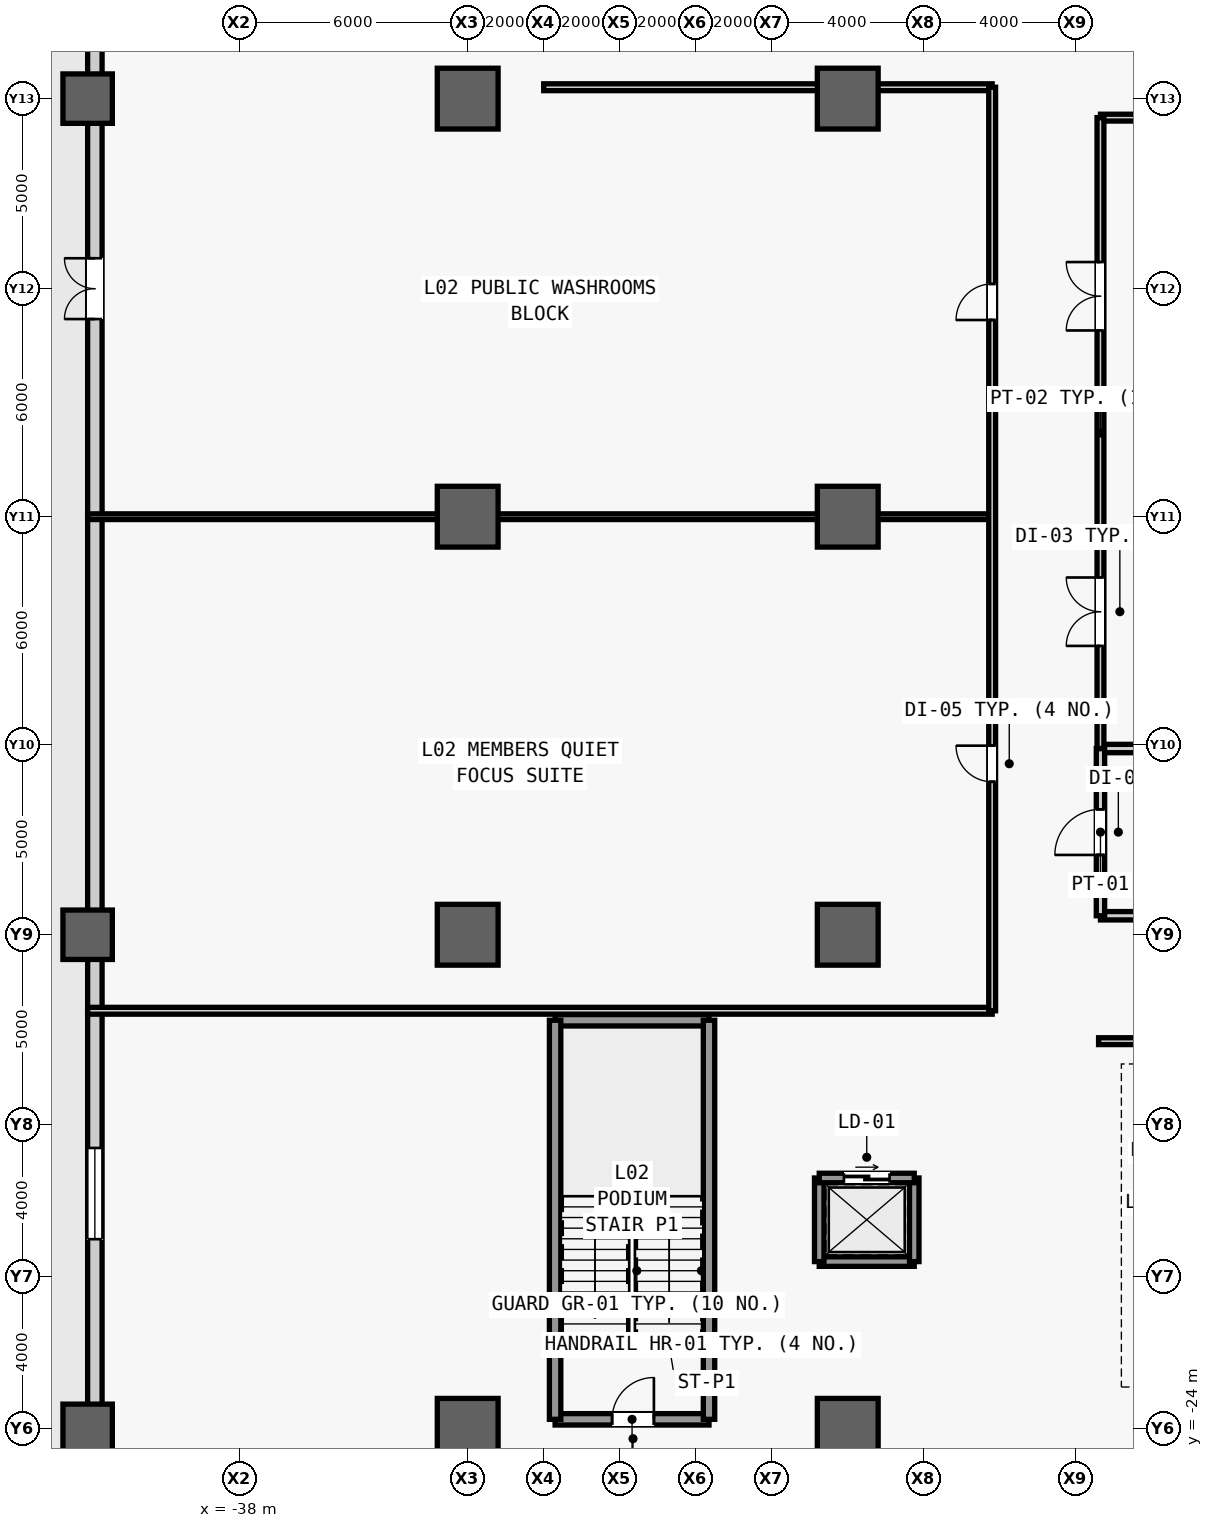
"""IFC4 building model, lengths in metres.
Left out: names, types, materials, properties, quantities, classifications, styles, units other than length and angle.
Written with IfcOpenShell. Run it as: python <this file> out.ifc"""

import sys

from ifc_helpers import new_model, si_unit, direction, frame, frame_2d, origin, origin_2d, place, context, subcontext, project, spatial, rectangle, extrude, source, transform, mapped, element, fill, save


model = new_model("IFC4")
c1 = context("Model", 3, precision=1e-05, world=origin(), true_north=direction((0.0, 1.0)))
c2 = subcontext(c1, "Body", "Model", "MODEL_VIEW")
j1 = project(units=[si_unit("LENGTHUNIT", "METRE"), si_unit("PLANEANGLEUNIT", "RADIAN")], contexts=[c1])
p1 = place(None, origin())
s1 = spatial("IfcSite", under=j1, at=p1, CompositionType="ELEMENT")
p2 = place(p1, origin())
s2 = spatial("IfcBuilding", under=s1, at=p2, CompositionType="ELEMENT")
p3 = place(p2, frame((0.0, 0.0, 12.0)))
s3 = spatial("IfcBuildingStorey", under=s2, at=p3, CompositionType="ELEMENT", Elevation=12.0)
m1 = source(origin(), c2, "Body", "SweptSolid", [
    extrude(rectangle(XDim=1.3, YDim=1.3, at=origin_2d()), origin(), (0.0, 0.0, 1.0), 5.4),
])
for number, where, z_axis, x_axis in (
    (1, (-42.0, -24.0, 0.0), (0.0, 0.0, 1.0), (1.0, 0.0, 0.0)),
    (2, (-42.0, -11.0, 0.0), (0.0, 0.0, 1.0), (1.0, 0.0, 0.0)),
    (3, (-42.0, 11.0, 0.0), (0.0, 0.0, 1.0), (1.0, 0.0, 0.0)),
):
    element("IfcColumn", number, at=place(p3, frame(where, z_axis=z_axis, x_axis=x_axis)), inside=s3, PredefinedType="COLUMN", context=c2, shape_type="MappedRepresentation", body=[
        mapped(m1, transform((0.0, 0.0, 0.0), scale=1.0)),
    ])
m2 = source(origin(), c2, "Body", "SweptSolid", [
    extrude(rectangle(XDim=1.6, YDim=1.6, at=origin_2d()), origin(), (0.0, 0.0, 1.0), 5.4),
])
for number, where, z_axis, x_axis in (
    (4, (-32.0, -24.0, 0.0), (0.0, 0.0, 1.0), (1.0, 0.0, 0.0)),
    (5, (-32.0, -11.0, 0.0), (0.0, 0.0, 1.0), (1.0, 0.0, 0.0)),
    (6, (-32.0, 0.0, 0.0), (0.0, 0.0, 1.0), (1.0, 0.0, 0.0)),
    (7, (-32.0, 11.0, 0.0), (0.0, 0.0, 1.0), (1.0, 0.0, 0.0)),
    (8, (-22.0, -24.0, 0.0), (0.0, 0.0, 1.0), (1.0, 0.0, 0.0)),
    (9, (-22.0, -11.0, 0.0), (0.0, 0.0, 1.0), (1.0, 0.0, 0.0)),
    (10, (-22.0, 0.0, 0.0), (0.0, 0.0, 1.0), (1.0, 0.0, 0.0)),
    (11, (-22.0, 11.0, 0.0), (0.0, 0.0, 1.0), (1.0, 0.0, 0.0)),
):
    element("IfcColumn", number, at=place(p3, frame(where, z_axis=z_axis, x_axis=x_axis)), inside=s3, PredefinedType="COLUMN", context=c2, shape_type="MappedRepresentation", body=[
        mapped(m2, transform((0.0, 0.0, 0.0), scale=1.0)),
    ])
m3 = source(origin(), c2, "Body", "SweptSolid", [
    extrude(rectangle(XDim=71.24, YDim=0.38, at=frame_2d((35.62, 0.0))), origin(), (0.0, 0.0, 1.0), 3.28),
])
p4 = place(p3, frame((-41.81, -35.62, 0.0), z_axis=(0.0, 0.0, 1.0), x_axis=(0.0, 1.0, 0.0)))
e12 = element("IfcWall", 12, at=p4, inside=s3, PredefinedType="STANDARD", context=c2, shape_type="MappedRepresentation", body=[
    mapped(m3, transform((0.0, 0.0, 0.0), scale=1.0)),
])
m4 = source(origin(), c2, "Body", "SweptSolid", [
    extrude(rectangle(XDim=1.6, YDim=2.25, at=frame_2d((0.8, 1.125))), frame((0.0, 0.2, 0.0), z_axis=(0.0, -1.0, 0.0), x_axis=(1.0, 0.0, 0.0)), (0.0, 0.0, 1.0), 0.4),
])
p5 = place(p4, frame((40.82, 0.0, 0.0)))
e13 = element("IfcOpeningElement", 13, at=p5, cuts=e12, PredefinedType="OPENING", context=c2, shape_type="MappedRepresentation", body=[
    mapped(m4, transform((0.0, 0.0, 0.0), scale=1.0)),
])
m5 = source(origin(), c2, "Body", "SweptSolid", [
    extrude(rectangle(XDim=2.4, YDim=2.56, at=frame_2d((1.2, 1.28))), frame((0.0, 0.2, 0.0), z_axis=(0.0, -1.0, 0.0), x_axis=(1.0, 0.0, 0.0)), (0.0, 0.0, 1.0), 0.4),
])
p6 = place(p4, frame((16.61, 0.0, 0.5)))
e14 = element("IfcOpeningElement", 14, at=p6, cuts=e12, PredefinedType="OPENING", context=c2, shape_type="MappedRepresentation", body=[
    mapped(m5, transform((0.0, 0.0, 0.0), scale=1.0)),
])
p7 = place(p4, frame((52.23, 0.0, 0.5)))
e15 = element("IfcOpeningElement", 15, at=p7, cuts=e12, PredefinedType="OPENING", context=c2, shape_type="MappedRepresentation", body=[
    mapped(m5, transform((0.0, 0.0, 0.0), scale=1.0)),
])
m6 = source(origin(), c2, "Body", "SweptSolid", [
    extrude(rectangle(XDim=4.05, YDim=0.22, at=frame_2d((2.025, 0.0))), origin(), (0.0, 0.0, 1.0), 5.08),
])
for number, where, z_axis, x_axis in (
    (16, (-15.35, -10.5, 0.0), (0.0, 0.0, 1.0), (1.0, 0.0, 0.0)),
    (17, (-15.35, -6.1, 0.0), (0.0, 0.0, 1.0), (1.0, 0.0, 0.0)),
):
    element("IfcWall", number, at=place(p3, frame(where, z_axis=z_axis, x_axis=x_axis)), inside=s3, PredefinedType="PARTITIONING", context=c2, shape_type="MappedRepresentation", body=[
        mapped(m6, transform((0.0, 0.0, 0.0), scale=1.0)),
    ])
m7 = source(origin(), c2, "Body", "SweptSolid", [
    extrude(rectangle(XDim=4.4, YDim=0.22, at=frame_2d((2.2, 0.0))), origin(), (0.0, 0.0, 1.0), 5.08),
])
p8 = place(p3, frame((-15.35, -10.5, 0.0), z_axis=(0.0, 0.0, 1.0), x_axis=(0.0, 1.0, 0.0)))
e18 = element("IfcWall", 18, at=p8, inside=s3, PredefinedType="PARTITIONING", context=c2, shape_type="MappedRepresentation", body=[
    mapped(m7, transform((0.0, 0.0, 0.0), scale=1.0)),
])
m8 = source(origin(), c2, "Body", "SweptSolid", [
    extrude(rectangle(XDim=1.2, YDim=2.2, at=frame_2d((0.6, 1.1))), frame((0.0, 0.12, 0.0), z_axis=(0.0, -1.0, 0.0), x_axis=(1.0, 0.0, 0.0)), (0.0, 0.0, 1.0), 0.24),
])
p9 = place(p8, frame((1.6, 0.0, 0.0)))
e19 = element("IfcOpeningElement", 19, at=p9, cuts=e18, PredefinedType="OPENING", context=c2, shape_type="MappedRepresentation", body=[
    mapped(m8, transform((0.0, 0.0, 0.0), scale=1.0)),
])
m9 = source(origin(), c2, "Body", "SweptSolid", [
    extrude(rectangle(XDim=4.05, YDim=0.18, at=frame_2d((2.025, 0.0))), origin(), (0.0, 0.0, 1.0), 5.08),
])
p10 = place(p3, frame((-15.35, 10.5, 0.0), z_axis=(0.0, 0.0, 1.0), x_axis=(1.0, 0.0, 0.0)))
e20 = element("IfcWall", 20, at=p10, inside=s3, PredefinedType="PARTITIONING", context=c2, shape_type="MappedRepresentation", body=[
    mapped(m9, transform((0.0, 0.0, 0.0), scale=1.0)),
])
m10 = source(origin(), c2, "Body", "SweptSolid", [
    extrude(rectangle(XDim=16.6, YDim=0.18, at=frame_2d((8.3, 0.0))), origin(), (0.0, 0.0, 1.0), 5.08),
])
p11 = place(p3, frame((-15.35, -6.1, 0.0), z_axis=(0.0, 0.0, 1.0), x_axis=(0.0, 1.0, 0.0)))
e21 = element("IfcWall", 21, at=p11, inside=s3, PredefinedType="PARTITIONING", context=c2, shape_type="MappedRepresentation", body=[
    mapped(m10, transform((0.0, 0.0, 0.0), scale=1.0)),
])
m11 = source(origin(), c2, "Body", "SweptSolid", [
    extrude(rectangle(XDim=1.8, YDim=2.25, at=frame_2d((0.9, 1.125))), frame((0.0, 0.1, 0.0), z_axis=(0.0, -1.0, 0.0), x_axis=(1.0, 0.0, 0.0)), (0.0, 0.0, 1.0), 0.2),
])
p12 = place(p11, frame((2.7, 0.0, 0.0)))
e22 = element("IfcOpeningElement", 22, at=p12, cuts=e21, PredefinedType="OPENING", context=c2, shape_type="MappedRepresentation", body=[
    mapped(m11, transform((0.0, 0.0, 0.0), scale=1.0)),
])
p13 = place(p11, frame((11.0, 0.0, 0.0)))
e23 = element("IfcOpeningElement", 23, at=p13, cuts=e21, PredefinedType="OPENING", context=c2, shape_type="MappedRepresentation", body=[
    mapped(m11, transform((0.0, 0.0, 0.0), scale=1.0)),
])
m12 = source(origin(), c2, "Body", "SweptSolid", [
    extrude(rectangle(XDim=4.05, YDim=0.3, at=frame_2d((2.025, 0.0))), origin(), (0.0, 0.0, 1.0), 5.08),
])
p14 = place(p3, frame((-29.7, -23.75, 0.0), z_axis=(0.0, 0.0, 1.0), x_axis=(1.0, 0.0, 0.0)))
e24 = element("IfcWall", 24, at=p14, inside=s3, PredefinedType="SHEAR", context=c2, shape_type="MappedRepresentation", body=[
    mapped(m12, transform((0.0, 0.0, 0.0), scale=1.0)),
])
m13 = source(origin(), c2, "Body", "SweptSolid", [
    extrude(rectangle(XDim=1.1, YDim=2.2, at=frame_2d((0.55, 1.1))), frame((0.0, 0.16, 0.0), z_axis=(0.0, -1.0, 0.0), x_axis=(1.0, 0.0, 0.0)), (0.0, 0.0, 1.0), 0.32),
])
p15 = place(p14, frame((1.5, 0.0, 0.0)))
e25 = element("IfcOpeningElement", 25, at=p15, cuts=e24, PredefinedType="OPENING", context=c2, shape_type="MappedRepresentation", body=[
    mapped(m13, transform((0.0, 0.0, 0.0), scale=1.0)),
])
p16 = place(p3, frame((-29.7, -13.25, 0.0), z_axis=(0.0, 0.0, 1.0), x_axis=(1.0, 0.0, 0.0)))
e26 = element("IfcWall", 26, at=p16, inside=s3, PredefinedType="SHEAR", context=c2, shape_type="MappedRepresentation", body=[
    mapped(m12, transform((0.0, 0.0, 0.0), scale=1.0)),
])
m14 = source(origin(), c2, "Body", "SweptSolid", [
    extrude(rectangle(XDim=10.5, YDim=0.3, at=frame_2d((5.25, 0.0))), origin(), (0.0, 0.0, 1.0), 5.08),
])
for number, where, z_axis, x_axis in (
    (27, (-29.7, -23.75, 0.0), (0.0, 0.0, 1.0), (0.0, 1.0, 0.0)),
    (28, (-25.65, -23.75, 0.0), (0.0, 0.0, 1.0), (0.0, 1.0, 0.0)),
):
    element("IfcWall", number, at=place(p3, frame(where, z_axis=z_axis, x_axis=x_axis)), inside=s3, PredefinedType="SHEAR", context=c2, shape_type="MappedRepresentation", body=[
        mapped(m14, transform((0.0, 0.0, 0.0), scale=1.0)),
    ])
m15 = source(origin(), c2, "Body", "SweptSolid", [
    extrude(rectangle(XDim=2.5, YDim=0.25, at=frame_2d((1.25, 0.0))), origin(), (0.0, 0.0, 1.0), 5.08),
])
p17 = place(p3, frame((-22.75, -19.6, 0.0), z_axis=(0.0, 0.0, 1.0), x_axis=(1.0, 0.0, 0.0)))
e29 = element("IfcWall", 29, at=p17, inside=s3, PredefinedType="SHEAR", context=c2, shape_type="MappedRepresentation", body=[
    mapped(m15, transform((0.0, 0.0, 0.0), scale=1.0)),
])
m16 = source(origin(), c2, "Body", "SweptSolid", [
    extrude(rectangle(XDim=2.2, YDim=0.25, at=frame_2d((1.1, 0.0))), origin(), (0.0, 0.0, 1.0), 5.08),
])
for number, where, z_axis, x_axis in (
    (30, (-22.75, -19.6, 0.0), (0.0, 0.0, 1.0), (0.0, 1.0, 0.0)),
    (31, (-20.25, -19.6, 0.0), (0.0, 0.0, 1.0), (0.0, 1.0, 0.0)),
):
    element("IfcWall", number, at=place(p3, frame(where, z_axis=z_axis, x_axis=x_axis)), inside=s3, PredefinedType="SHEAR", context=c2, shape_type="MappedRepresentation", body=[
        mapped(m16, transform((0.0, 0.0, 0.0), scale=1.0)),
    ])
p18 = place(p3, frame((-22.75, -17.4, 0.0), z_axis=(0.0, 0.0, 1.0), x_axis=(1.0, 0.0, 0.0)))
e32 = element("IfcWall", 32, at=p18, inside=s3, PredefinedType="SHEAR", context=c2, shape_type="MappedRepresentation", body=[
    mapped(m15, transform((0.0, 0.0, 0.0), scale=1.0)),
])
m17 = source(origin(), c2, "Body", "SweptSolid", [
    extrude(rectangle(XDim=1.2, YDim=2.3, at=frame_2d((0.6, 1.15))), frame((0.0, 0.135, 0.0), z_axis=(0.0, -1.0, 0.0), x_axis=(1.0, 0.0, 0.0)), (0.0, 0.0, 1.0), 0.27),
])
p19 = place(p18, frame((0.65, 0.0, 0.0)))
e33 = element("IfcOpeningElement", 33, at=p19, cuts=e32, PredefinedType="OPENING", context=c2, shape_type="MappedRepresentation", body=[
    mapped(m17, transform((0.0, 0.0, 0.0), scale=1.0)),
])
m18 = source(origin(), c2, "Body", "SweptSolid", [
    extrude(rectangle(XDim=30.8, YDim=0.18, at=frame_2d((15.4, 0.0))), origin(), (0.0, 0.0, 1.0), 5.08),
])
p20 = place(p3, frame((-15.4, -13.8, 0.0), z_axis=(0.0, 0.0, 1.0), x_axis=(1.0, 0.0, 0.0)))
e34 = element("IfcWall", 34, at=p20, inside=s3, PredefinedType="PARTITIONING", context=c2, shape_type="MappedRepresentation", body=[
    mapped(m18, transform((0.0, 0.0, 0.0), scale=1.0)),
])
p21 = place(p20, frame((2.7, 0.0, 0.0)))
e35 = element("IfcOpeningElement", 35, at=p21, cuts=e34, PredefinedType="OPENING", context=c2, shape_type="MappedRepresentation", body=[
    mapped(m11, transform((0.0, 0.0, 0.0), scale=1.0)),
])
p22 = place(p20, frame((26.3, 0.0, 0.0)))
e36 = element("IfcOpeningElement", 36, at=p22, cuts=e34, PredefinedType="OPENING", context=c2, shape_type="MappedRepresentation", body=[
    mapped(m11, transform((0.0, 0.0, 0.0), scale=1.0)),
])
m19 = source(origin(), c2, "Body", "SweptSolid", [
    extrude(rectangle(XDim=11.8, YDim=0.18, at=frame_2d((5.9, 0.0))), origin(), (0.0, 0.0, 1.0), 3.28),
])
p23 = place(p3, frame((-30.0, 11.3, 0.0), z_axis=(0.0, 0.0, 1.0), x_axis=(1.0, 0.0, 0.0)))
e37 = element("IfcWall", 37, at=p23, inside=s3, PredefinedType="PARTITIONING", context=c2, shape_type="MappedRepresentation", body=[
    mapped(m19, transform((0.0, 0.0, 0.0), scale=1.0)),
])
m20 = source(origin(), c2, "Body", "SweptSolid", [
    extrude(rectangle(XDim=23.8, YDim=0.18, at=frame_2d((11.9, 0.0))), origin(), (0.0, 0.0, 1.0), 5.08),
])
p24 = place(p3, frame((-42.0, -13.0, 0.0), z_axis=(0.0, 0.0, 1.0), x_axis=(1.0, 0.0, 0.0)))
e38 = element("IfcWall", 38, at=p24, inside=s3, PredefinedType="PARTITIONING", context=c2, shape_type="MappedRepresentation", body=[
    mapped(m20, transform((0.0, 0.0, 0.0), scale=1.0)),
])
m21 = source(origin(), c2, "Body", "SweptSolid", [
    extrude(rectangle(XDim=23.8, YDim=0.15, at=frame_2d((11.9, 0.0))), origin(), (0.0, 0.0, 1.0), 3.28),
])
p25 = place(p3, frame((-42.0, 0.0, 0.0), z_axis=(0.0, 0.0, 1.0), x_axis=(1.0, 0.0, 0.0)))
e39 = element("IfcWall", 39, at=p25, inside=s3, PredefinedType="PARTITIONING", context=c2, shape_type="MappedRepresentation", body=[
    mapped(m21, transform((0.0, 0.0, 0.0), scale=1.0)),
])
m22 = source(origin(), c2, "Body", "SweptSolid", [
    extrude(rectangle(XDim=24.3, YDim=0.18, at=frame_2d((12.15, 0.0))), origin(), (0.0, 0.0, 1.0), 5.08),
])
p26 = place(p3, frame((-18.2, -13.0, 0.0), z_axis=(0.0, 0.0, 1.0), x_axis=(0.0, 1.0, 0.0)))
e40 = element("IfcWall", 40, at=p26, inside=s3, PredefinedType="PARTITIONING", context=c2, shape_type="MappedRepresentation", body=[
    mapped(m22, transform((0.0, 0.0, 0.0), scale=1.0)),
])
m23 = source(origin(), c2, "Body", "SweptSolid", [
    extrude(rectangle(XDim=0.95, YDim=2.15, at=frame_2d((0.475, 1.075))), frame((0.0, 0.1, 0.0), z_axis=(0.0, -1.0, 0.0), x_axis=(1.0, 0.0, 0.0)), (0.0, 0.0, 1.0), 0.2),
])
p27 = place(p26, frame((6.025, 0.0, 0.0)))
e41 = element("IfcOpeningElement", 41, at=p27, cuts=e40, PredefinedType="OPENING", context=c2, shape_type="MappedRepresentation", body=[
    mapped(m23, transform((0.0, 0.0, 0.0), scale=1.0)),
])
p28 = place(p26, frame((18.175, 0.0, 0.0)))
e42 = element("IfcOpeningElement", 42, at=p28, cuts=e40, PredefinedType="OPENING", context=c2, shape_type="MappedRepresentation", body=[
    mapped(m23, transform((0.0, 0.0, 0.0), scale=1.0)),
])
m24 = source(origin(), c2, "Body", "SweptSolid", [
    extrude(rectangle(XDim=1.6, YDim=2.25, at=frame_2d((0.8, 1.125))), frame((0.0, 0.025, 0.0), z_axis=(0.0, -1.0, 0.0), x_axis=(1.0, 0.0, 0.0)), (0.0, 0.0, 1.0), 0.05),
])
p29 = place(p5, origin())
e43 = element("IfcDoor", 43, at=p29, inside=s3, OperationType="DOUBLE_DOOR_SINGLE_SWING", PredefinedType="DOOR", context=c2, shape_type="MappedRepresentation", body=[
    mapped(m24, transform((0.0, 0.0, 0.0), scale=1.0)),
])
fill(e13, e43)
m25 = source(origin(), c2, "Body", "SweptSolid", [
    extrude(rectangle(XDim=2.4, YDim=2.56, at=frame_2d((1.2, 1.28))), frame((0.0, 0.03, 0.0), z_axis=(0.0, -1.0, 0.0), x_axis=(1.0, 0.0, 0.0)), (0.0, 0.0, 1.0), 0.06),
])
p30 = place(p6, origin())
e44 = element("IfcWindow", 44, at=p30, inside=s3, PartitioningType="SINGLE_PANEL", PredefinedType="WINDOW", context=c2, shape_type="MappedRepresentation", body=[
    mapped(m25, transform((0.0, 0.0, 0.0), scale=1.0)),
])
fill(e14, e44)
m26 = source(origin(), c2, "Body", "SweptSolid", [
    extrude(rectangle(XDim=1.2, YDim=2.2, at=frame_2d((0.6, 1.1))), frame((0.0, 0.025, 0.0), z_axis=(0.0, -1.0, 0.0), x_axis=(1.0, 0.0, 0.0)), (0.0, 0.0, 1.0), 0.05),
])
p31 = place(p9, origin())
e45 = element("IfcDoor", 45, at=p31, inside=s3, OperationType="SINGLE_SWING_LEFT", PredefinedType="DOOR", context=c2, shape_type="MappedRepresentation", body=[
    mapped(m26, transform((0.0, 0.0, 0.0), scale=1.0)),
])
fill(e19, e45)
m27 = source(origin(), c2, "Body", "SweptSolid", [
    extrude(rectangle(XDim=1.8, YDim=2.25, at=frame_2d((0.9, 1.125))), frame((0.0, 0.025, 0.0), z_axis=(0.0, -1.0, 0.0), x_axis=(1.0, 0.0, 0.0)), (0.0, 0.0, 1.0), 0.05),
])
p32 = place(p12, origin())
e46 = element("IfcDoor", 46, at=p32, inside=s3, OperationType="SINGLE_SWING_LEFT", PredefinedType="DOOR", context=c2, shape_type="MappedRepresentation", body=[
    mapped(m27, transform((0.0, 0.0, 0.0), scale=1.0)),
])
fill(e22, e46)
p33 = place(p13, origin())
e47 = element("IfcDoor", 47, at=p33, inside=s3, OperationType="SINGLE_SWING_RIGHT", PredefinedType="DOOR", context=c2, shape_type="MappedRepresentation", body=[
    mapped(m27, transform((0.0, 0.0, 0.0), scale=1.0)),
])
fill(e23, e47)
m28 = source(origin(), c2, "Body", "SweptSolid", [
    extrude(rectangle(XDim=1.1, YDim=2.2, at=frame_2d((0.55, 1.1))), frame((0.0, 0.025, 0.0), z_axis=(0.0, -1.0, 0.0), x_axis=(1.0, 0.0, 0.0)), (0.0, 0.0, 1.0), 0.05),
])
p34 = place(p15, origin())
e48 = element("IfcDoor", 48, at=p34, inside=s3, OperationType="SINGLE_SWING_RIGHT", PredefinedType="DOOR", context=c2, shape_type="MappedRepresentation", body=[
    mapped(m28, transform((0.0, 0.0, 0.0), scale=1.0)),
])
fill(e25, e48)
m29 = source(origin(), c2, "Body", "SweptSolid", [
    extrude(rectangle(XDim=0.95, YDim=2.15, at=frame_2d((0.475, 1.075))), frame((0.0, 0.025, 0.0), z_axis=(0.0, -1.0, 0.0), x_axis=(1.0, 0.0, 0.0)), (0.0, 0.0, 1.0), 0.05),
])
p35 = place(p27, origin())
e49 = element("IfcDoor", 49, at=p35, inside=s3, OperationType="SINGLE_SWING_RIGHT", PredefinedType="DOOR", context=c2, shape_type="MappedRepresentation", body=[
    mapped(m29, transform((0.0, 0.0, 0.0), scale=1.0)),
])
fill(e41, e49)
p36 = place(p28, origin())
e50 = element("IfcDoor", 50, at=p36, inside=s3, OperationType="SINGLE_SWING_LEFT", PredefinedType="DOOR", context=c2, shape_type="MappedRepresentation", body=[
    mapped(m29, transform((0.0, 0.0, 0.0), scale=1.0)),
])
fill(e42, e50)
m30 = source(origin(), c2, "Body", "SweptSolid", [
    extrude(rectangle(XDim=1.2, YDim=2.3, at=frame_2d((0.6, 1.15))), frame((0.0, 0.025, 0.0), z_axis=(0.0, -1.0, 0.0), x_axis=(1.0, 0.0, 0.0)), (0.0, 0.0, 1.0), 0.05),
])
p37 = place(p19, origin())
e51 = element("IfcDoor", 51, at=p37, inside=s3, OperationType="SLIDING_TO_LEFT", PredefinedType="DOOR", context=c2, shape_type="MappedRepresentation", body=[
    mapped(m30, transform((0.0, 0.0, 0.0), scale=1.0)),
])
fill(e33, e51)
save(model, sys.argv[1])
